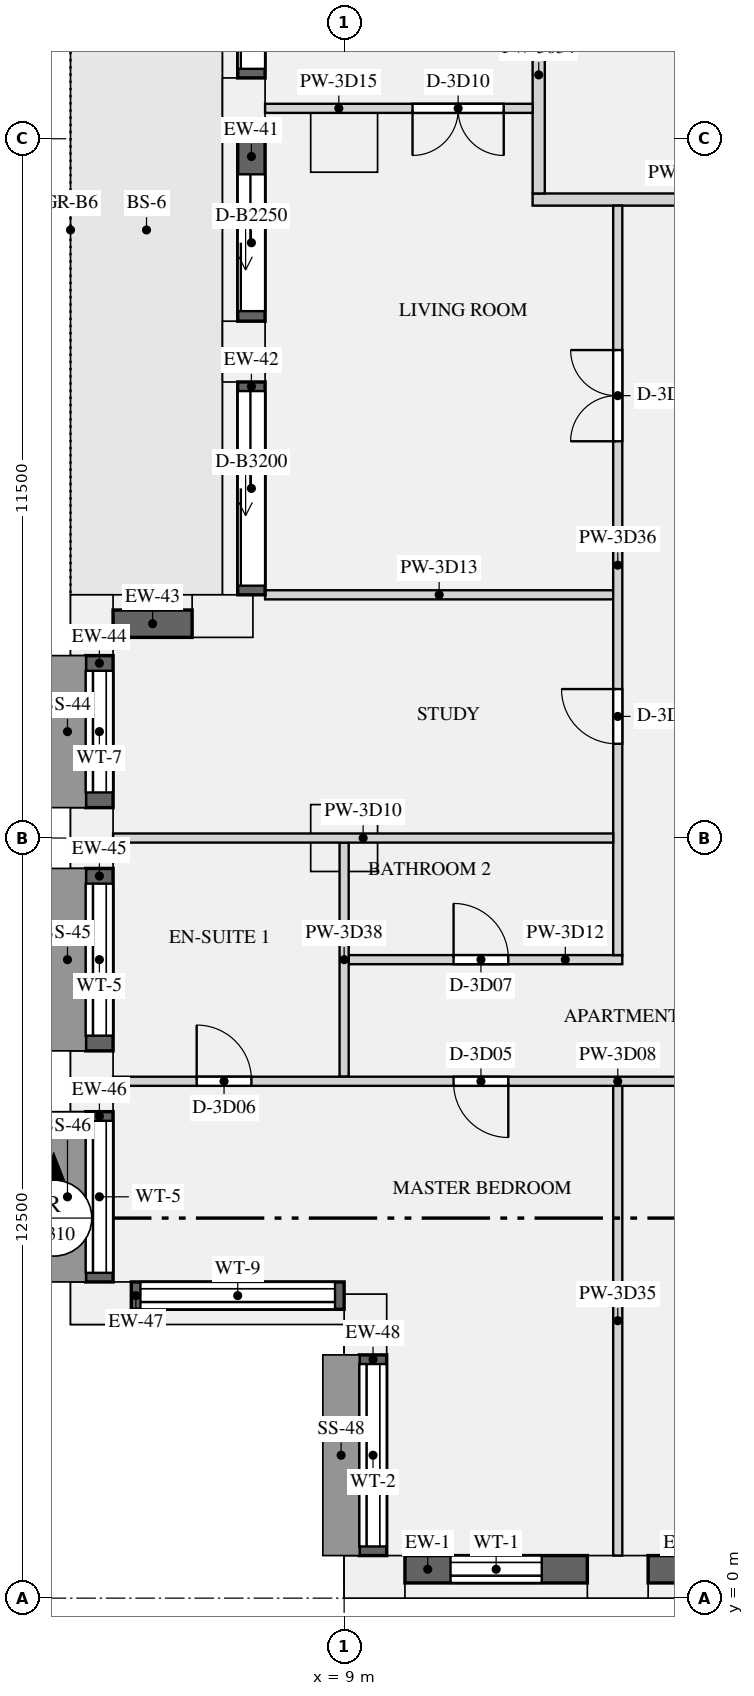
"""IFC4 building model, lengths in metres.
Left out: names, types, materials, properties, quantities, classifications, styles, units other than length and angle.
Written with IfcOpenShell. Run it as: python <this file> out.ifc"""

import sys

from ifc_helpers import new_model, si_unit, direction, frame, frame_2d, origin, origin_2d, place, context, subcontext, project, spatial, rectangle, extrude, element, fill, save


model = new_model("IFC4")
c1 = context("Model", 3, precision=1e-05, world=origin(), true_north=direction((0.0, 1.0)))
c2 = subcontext(c1, "Body", "Model", "MODEL_VIEW")
j1 = project(units=[si_unit("LENGTHUNIT", "METRE"), si_unit("PLANEANGLEUNIT", "RADIAN")], contexts=[c1])
p1 = place(None, origin())
s1 = spatial("IfcSite", under=j1, at=p1, CompositionType="ELEMENT")
p2 = place(p1, origin())
s2 = spatial("IfcBuilding", under=s1, at=p2, CompositionType="ELEMENT")
p3 = place(p2, frame((0.0, 0.0, 166.5)))
s3 = spatial("IfcBuildingStorey", under=s2, at=p3, CompositionType="ELEMENT", Elevation=166.5)
for number, where, z_axis, x_axis in (
    (1, (9.5, 0.35, 0.0), (0.0, 0.0, 1.0), (1.0, 0.0, 0.0)),
    (2, (13.5, 0.35, 0.0), (0.0, 0.0, 1.0), (1.0, 0.0, 0.0)),
    (3, (7.35, 24.5, 0.0), (0.0, 0.0, 1.0), (0.0, -1.0, 0.0)),
    (4, (7.35, 20.5, 0.0), (0.0, 0.0, 1.0), (0.0, -1.0, 0.0)),
    (5, (7.0, 16.15, 0.0), (0.0, 0.0, 1.0), (-1.0, 0.0, 0.0)),
    (6, (4.85, 16.0, 0.0), (0.0, 0.0, 1.0), (0.0, -1.0, 0.0)),
    (7, (4.85, 12.5, 0.0), (0.0, 0.0, 1.0), (0.0, -1.0, 0.0)),
    (8, (4.85, 8.5, 0.0), (0.0, 0.0, 1.0), (0.0, -1.0, 0.0)),
    (9, (5.0, 4.85, 0.0), (0.0, 0.0, 1.0), (1.0, 0.0, 0.0)),
    (10, (9.35, 4.5, 0.0), (0.0, 0.0, 1.0), (0.0, -1.0, 0.0)),
):
    element("IfcColumn", number, at=place(p3, frame(where, z_axis=z_axis, x_axis=x_axis)), inside=s3, PredefinedType="USERDEFINED", context=c2, shape_type="SweptSolid", body=[
        extrude(rectangle(XDim=1.0, YDim=0.7, at=origin_2d()), origin(), (0.0, 0.0, 1.0), 3.15),
    ])
for number, where, z_axis, x_axis in (
    (11, (9.0, 24.0, 0.0), (0.0, 0.0, 1.0), (1.0, 0.0, 0.0)),
    (12, (9.0, 12.5, 0.0), (0.0, 0.0, 1.0), (1.0, 0.0, 0.0)),
):
    element("IfcColumn", number, at=place(p3, frame(where, z_axis=z_axis, x_axis=x_axis)), inside=s3, PredefinedType="COLUMN", context=c2, shape_type="SweptSolid", body=[
        extrude(rectangle(XDim=1.1, YDim=1.1, at=origin_2d()), origin(), (0.0, 0.0, 1.0), 3.15),
    ])
p4 = place(p3, frame((10.0, 0.475, 0.9), z_axis=(0.0, 0.0, 1.0), x_axis=(1.0, 0.0, 0.0)))
e13 = element("IfcWall", 13, at=p4, inside=s3, PredefinedType="SOLIDWALL", context=c2, shape_type="SweptSolid", body=[
    extrude(rectangle(XDim=3.0, YDim=0.45, at=frame_2d((1.5, 0.0))), origin(), (0.0, 0.0, 1.0), 1.93),
])
p5 = place(p4, frame((0.75, 0.0, 0.15)))
e14 = element("IfcOpeningElement", 14, at=p5, cuts=e13, PredefinedType="OPENING", context=c2, shape_type="SweptSolid", body=[
    extrude(rectangle(XDim=1.5, YDim=1.5, at=frame_2d((0.75, 0.75))), frame((0.0, 0.235, 0.0), z_axis=(0.0, -1.0, 0.0), x_axis=(1.0, 0.0, 0.0)), (0.0, 0.0, 1.0), 0.47),
])
p6 = place(p3, frame((14.0, 0.475, 0.9), z_axis=(0.0, 0.0, 1.0), x_axis=(1.0, 0.0, 0.0)))
e15 = element("IfcWall", 15, at=p6, inside=s3, PredefinedType="SOLIDWALL", context=c2, shape_type="SweptSolid", body=[
    extrude(rectangle(XDim=4.0, YDim=0.45, at=frame_2d((2.0, 0.0))), origin(), (0.0, 0.0, 1.0), 1.93),
])
p7 = place(p6, frame((1.25, 0.0, 0.15)))
e16 = element("IfcOpeningElement", 16, at=p7, cuts=e15, PredefinedType="OPENING", context=c2, shape_type="SweptSolid", body=[
    extrude(rectangle(XDim=1.5, YDim=1.5, at=frame_2d((0.75, 0.75))), frame((0.0, 0.235, 0.0), z_axis=(0.0, -1.0, 0.0), x_axis=(1.0, 0.0, 0.0)), (0.0, 0.0, 1.0), 0.47),
])
p8 = place(p3, frame((7.475, 28.0, 0.0), z_axis=(0.0, 0.0, 1.0), x_axis=(0.0, -1.0, 0.0)))
e17 = element("IfcWall", 17, at=p8, inside=s3, PredefinedType="SOLIDWALL", context=c2, shape_type="SweptSolid", body=[
    extrude(rectangle(XDim=3.0, YDim=0.45, at=frame_2d((1.5, 0.0))), origin(), (0.0, 0.0, 1.0), 2.83),
])
p9 = place(p8, frame((0.15, 0.0, 0.0)))
e18 = element("IfcOpeningElement", 18, at=p9, cuts=e17, PredefinedType="OPENING", context=c2, shape_type="SweptSolid", body=[
    extrude(rectangle(XDim=2.7, YDim=2.3, at=frame_2d((1.35, 1.15))), frame((0.0, 0.235, 0.0), z_axis=(0.0, -1.0, 0.0), x_axis=(1.0, 0.0, 0.0)), (0.0, 0.0, 1.0), 0.47),
])
p10 = place(p3, frame((7.475, 24.0, 0.0), z_axis=(0.0, 0.0, 1.0), x_axis=(0.0, -1.0, 0.0)))
e19 = element("IfcWall", 19, at=p10, inside=s3, PredefinedType="SOLIDWALL", context=c2, shape_type="SweptSolid", body=[
    extrude(rectangle(XDim=3.0, YDim=0.45, at=frame_2d((1.5, 0.0))), origin(), (0.0, 0.0, 1.0), 2.83),
])
p11 = place(p10, frame((0.585, 0.0, 0.0)))
e20 = element("IfcOpeningElement", 20, at=p11, cuts=e19, PredefinedType="OPENING", context=c2, shape_type="SweptSolid", body=[
    extrude(rectangle(XDim=2.25, YDim=2.3, at=frame_2d((1.125, 1.15))), frame((0.0, 0.235, 0.0), z_axis=(0.0, -1.0, 0.0), x_axis=(1.0, 0.0, 0.0)), (0.0, 0.0, 1.0), 0.47),
])
p12 = place(p3, frame((7.475, 20.0, 0.0), z_axis=(0.0, 0.0, 1.0), x_axis=(0.0, -1.0, 0.0)))
e21 = element("IfcWall", 21, at=p12, inside=s3, PredefinedType="SOLIDWALL", context=c2, shape_type="SweptSolid", body=[
    extrude(rectangle(XDim=3.5, YDim=0.45, at=frame_2d((1.75, 0.0))), origin(), (0.0, 0.0, 1.0), 2.83),
])
p13 = place(p12, frame((0.15, 0.0, 0.0)))
e22 = element("IfcOpeningElement", 22, at=p13, cuts=e21, PredefinedType="OPENING", context=c2, shape_type="SweptSolid", body=[
    extrude(rectangle(XDim=3.2, YDim=2.3, at=frame_2d((1.6, 1.15))), frame((0.0, 0.235, 0.0), z_axis=(0.0, -1.0, 0.0), x_axis=(1.0, 0.0, 0.0)), (0.0, 0.0, 1.0), 0.47),
])
p14 = place(p3, frame((6.5, 16.025, 0.9), z_axis=(0.0, 0.0, 1.0), x_axis=(-1.0, 0.0, 0.0)))
e23 = element("IfcWall", 23, at=p14, inside=s3, PredefinedType="SOLIDWALL", context=c2, shape_type="SweptSolid", body=[
    extrude(rectangle(XDim=1.3, YDim=0.45, at=frame_2d((0.65, 0.0))), origin(), (0.0, 0.0, 1.0), 1.93),
])
p15 = place(p3, frame((4.975, 15.5, 0.9), z_axis=(0.0, 0.0, 1.0), x_axis=(0.0, -1.0, 0.0)))
e24 = element("IfcWall", 24, at=p15, inside=s3, PredefinedType="SOLIDWALL", context=c2, shape_type="SweptSolid", body=[
    extrude(rectangle(XDim=2.5, YDim=0.45, at=frame_2d((1.25, 0.0))), origin(), (0.0, 0.0, 1.0), 1.93),
])
p16 = place(p15, frame((0.25, 0.0, 0.15)))
e25 = element("IfcOpeningElement", 25, at=p16, cuts=e24, PredefinedType="OPENING", context=c2, shape_type="SweptSolid", body=[
    extrude(rectangle(XDim=2.0, YDim=1.5, at=frame_2d((1.0, 0.75))), frame((0.0, 0.235, 0.0), z_axis=(0.0, -1.0, 0.0), x_axis=(1.0, 0.0, 0.0)), (0.0, 0.0, 1.0), 0.47),
])
p17 = place(p3, frame((4.975, 12.0, 0.9), z_axis=(0.0, 0.0, 1.0), x_axis=(0.0, -1.0, 0.0)))
e26 = element("IfcWall", 26, at=p17, inside=s3, PredefinedType="SOLIDWALL", context=c2, shape_type="SweptSolid", body=[
    extrude(rectangle(XDim=3.0, YDim=0.45, at=frame_2d((1.5, 0.0))), origin(), (0.0, 0.0, 1.0), 1.93),
])
p18 = place(p17, frame((0.25, 0.0, 0.15)))
e27 = element("IfcOpeningElement", 27, at=p18, cuts=e26, PredefinedType="OPENING", context=c2, shape_type="SweptSolid", body=[
    extrude(rectangle(XDim=2.5, YDim=1.5, at=frame_2d((1.25, 0.75))), frame((0.0, 0.235, 0.0), z_axis=(0.0, -1.0, 0.0), x_axis=(1.0, 0.0, 0.0)), (0.0, 0.0, 1.0), 0.47),
])
p19 = place(p3, frame((4.975, 8.0, 0.9), z_axis=(0.0, 0.0, 1.0), x_axis=(0.0, -1.0, 0.0)))
e28 = element("IfcWall", 28, at=p19, inside=s3, PredefinedType="SOLIDWALL", context=c2, shape_type="SweptSolid", body=[
    extrude(rectangle(XDim=2.8, YDim=0.45, at=frame_2d((1.4, 0.0))), origin(), (0.0, 0.0, 1.0), 1.93),
])
p20 = place(p19, frame((0.15, 0.0, 0.15)))
e29 = element("IfcOpeningElement", 29, at=p20, cuts=e28, PredefinedType="OPENING", context=c2, shape_type="SweptSolid", body=[
    extrude(rectangle(XDim=2.5, YDim=1.5, at=frame_2d((1.25, 0.75))), frame((0.0, 0.235, 0.0), z_axis=(0.0, -1.0, 0.0), x_axis=(1.0, 0.0, 0.0)), (0.0, 0.0, 1.0), 0.47),
])
p21 = place(p3, frame((5.5, 4.975, 0.9), z_axis=(0.0, 0.0, 1.0), x_axis=(1.0, 0.0, 0.0)))
e30 = element("IfcWall", 30, at=p21, inside=s3, PredefinedType="SOLIDWALL", context=c2, shape_type="SweptSolid", body=[
    extrude(rectangle(XDim=3.5, YDim=0.45, at=frame_2d((1.75, 0.0))), origin(), (0.0, 0.0, 1.0), 1.93),
])
p22 = place(p21, frame((0.15, 0.0, 0.15)))
e31 = element("IfcOpeningElement", 31, at=p22, cuts=e30, PredefinedType="OPENING", context=c2, shape_type="SweptSolid", body=[
    extrude(rectangle(XDim=3.2, YDim=1.5, at=frame_2d((1.6, 0.75))), frame((0.0, 0.235, 0.0), z_axis=(0.0, -1.0, 0.0), x_axis=(1.0, 0.0, 0.0)), (0.0, 0.0, 1.0), 0.47),
])
p23 = place(p3, frame((9.475, 4.0, 0.9), z_axis=(0.0, 0.0, 1.0), x_axis=(0.0, -1.0, 0.0)))
e32 = element("IfcWall", 32, at=p23, inside=s3, PredefinedType="SOLIDWALL", context=c2, shape_type="SweptSolid", body=[
    extrude(rectangle(XDim=3.3, YDim=0.45, at=frame_2d((1.65, 0.0))), origin(), (0.0, 0.0, 1.0), 1.93),
])
p24 = place(p23, frame((0.15, 0.0, 0.15)))
e33 = element("IfcOpeningElement", 33, at=p24, cuts=e32, PredefinedType="OPENING", context=c2, shape_type="SweptSolid", body=[
    extrude(rectangle(XDim=3.0, YDim=1.5, at=frame_2d((1.5, 0.75))), frame((0.0, 0.235, 0.0), z_axis=(0.0, -1.0, 0.0), x_axis=(1.0, 0.0, 0.0)), (0.0, 0.0, 1.0), 0.47),
])
p25 = place(p3, frame((12.1, 23.0, 0.0), z_axis=(0.0, 0.0, 1.0), x_axis=(1.0, 0.0, 0.0)))
e34 = element("IfcWall", 34, at=p25, inside=s3, PredefinedType="PARTITIONING", context=c2, shape_type="SweptSolid", body=[
    extrude(rectangle(XDim=5.0, YDim=0.2, at=frame_2d((2.5, 0.0))), origin(), (0.0, 0.0, 1.0), 2.83),
])
p26 = place(p3, frame((12.2, 23.1, 0.0), z_axis=(0.0, 0.0, 1.0), x_axis=(0.0, 1.0, 0.0)))
e35 = element("IfcWall", 35, at=p26, inside=s3, PredefinedType="PARTITIONING", context=c2, shape_type="SweptSolid", body=[
    extrude(rectangle(XDim=3.9, YDim=0.2, at=frame_2d((1.95, 0.0))), origin(), (0.0, 0.0, 1.0), 2.83),
])
p27 = place(p3, frame((5.2, 8.5, 0.0), z_axis=(0.0, 0.0, 1.0), x_axis=(1.0, 0.0, 0.0)))
e36 = element("IfcWall", 36, at=p27, inside=s3, PredefinedType="PARTITIONING", context=c2, shape_type="SweptSolid", body=[
    extrude(rectangle(XDim=12.8, YDim=0.15, at=frame_2d((6.4, 0.0))), origin(), (0.0, 0.0, 1.0), 2.83),
])
p28 = place(p27, frame((10.1, 0.0, 0.0)))
e37 = element("IfcOpeningElement", 37, at=p28, cuts=e36, PredefinedType="OPENING", context=c2, shape_type="SweptSolid", body=[
    extrude(rectangle(XDim=0.9, YDim=2.1, at=frame_2d((0.45, 1.05))), frame((0.0, 0.085, 0.0), z_axis=(0.0, -1.0, 0.0), x_axis=(1.0, 0.0, 0.0)), (0.0, 0.0, 1.0), 0.17),
])
p29 = place(p27, frame((5.6, 0.0, 0.0)))
e38 = element("IfcOpeningElement", 38, at=p29, cuts=e36, PredefinedType="OPENING", context=c2, shape_type="SweptSolid", body=[
    extrude(rectangle(XDim=0.9, YDim=2.1, at=frame_2d((0.45, 1.05))), frame((0.0, 0.085, 0.0), z_axis=(0.0, -1.0, 0.0), x_axis=(1.0, 0.0, 0.0)), (0.0, 0.0, 1.0), 0.17),
])
p30 = place(p27, frame((1.375, 0.0, 0.0)))
e39 = element("IfcOpeningElement", 39, at=p30, cuts=e36, PredefinedType="OPENING", context=c2, shape_type="SweptSolid", body=[
    extrude(rectangle(XDim=0.9, YDim=2.1, at=frame_2d((0.45, 1.05))), frame((0.0, 0.085, 0.0), z_axis=(0.0, -1.0, 0.0), x_axis=(1.0, 0.0, 0.0)), (0.0, 0.0, 1.0), 0.17),
])
p31 = place(p3, frame((5.2, 12.5, 0.0), z_axis=(0.0, 0.0, 1.0), x_axis=(1.0, 0.0, 0.0)))
e40 = element("IfcWall", 40, at=p31, inside=s3, PredefinedType="PARTITIONING", context=c2, shape_type="SweptSolid", body=[
    extrude(rectangle(XDim=8.225, YDim=0.15, at=frame_2d((4.113, 0.0))), origin(), (0.0, 0.0, 1.0), 2.83),
])
p32 = place(p3, frame((9.075, 10.5, 0.0), z_axis=(0.0, 0.0, 1.0), x_axis=(1.0, 0.0, 0.0)))
e41 = element("IfcWall", 41, at=p32, inside=s3, PredefinedType="PARTITIONING", context=c2, shape_type="SweptSolid", body=[
    extrude(rectangle(XDim=4.5, YDim=0.15, at=frame_2d((2.25, 0.0))), origin(), (0.0, 0.0, 1.0), 2.83),
])
p33 = place(p32, frame((1.725, 0.0, 0.0)))
e42 = element("IfcOpeningElement", 42, at=p33, cuts=e41, PredefinedType="OPENING", context=c2, shape_type="SweptSolid", body=[
    extrude(rectangle(XDim=0.9, YDim=2.1, at=frame_2d((0.45, 1.05))), frame((0.0, 0.085, 0.0), z_axis=(0.0, -1.0, 0.0), x_axis=(1.0, 0.0, 0.0)), (0.0, 0.0, 1.0), 0.17),
])
p34 = place(p3, frame((7.7, 16.5, 0.0), z_axis=(0.0, 0.0, 1.0), x_axis=(1.0, 0.0, 0.0)))
e43 = element("IfcWall", 43, at=p34, inside=s3, PredefinedType="PARTITIONING", context=c2, shape_type="SweptSolid", body=[
    extrude(rectangle(XDim=5.725, YDim=0.15, at=frame_2d((2.863, 0.0))), origin(), (0.0, 0.0, 1.0), 2.83),
])
p35 = place(p3, frame((7.7, 24.5, 0.0), z_axis=(0.0, 0.0, 1.0), x_axis=(1.0, 0.0, 0.0)))
e44 = element("IfcWall", 44, at=p35, inside=s3, PredefinedType="PARTITIONING", context=c2, shape_type="SweptSolid", body=[
    extrude(rectangle(XDim=4.4, YDim=0.15, at=frame_2d((2.2, 0.0))), origin(), (0.0, 0.0, 1.0), 2.83),
])
p36 = place(p35, frame((2.425, 0.0, 0.0)))
e45 = element("IfcOpeningElement", 45, at=p36, cuts=e44, PredefinedType="OPENING", context=c2, shape_type="SweptSolid", body=[
    extrude(rectangle(XDim=1.5, YDim=2.1, at=frame_2d((0.75, 1.05))), frame((0.0, 0.085, 0.0), z_axis=(0.0, -1.0, 0.0), x_axis=(1.0, 0.0, 0.0)), (0.0, 0.0, 1.0), 0.17),
])
p37 = place(p3, frame((13.5, 0.7, 0.0), z_axis=(0.0, 0.0, 1.0), x_axis=(0.0, 1.0, 0.0)))
e46 = element("IfcWall", 46, at=p37, inside=s3, PredefinedType="PARTITIONING", context=c2, shape_type="SweptSolid", body=[
    extrude(rectangle(XDim=7.725, YDim=0.15, at=frame_2d((3.863, 0.0))), origin(), (0.0, 0.0, 1.0), 2.83),
])
p38 = place(p3, frame((13.5, 10.575, 0.0), z_axis=(0.0, 0.0, 1.0), x_axis=(0.0, 1.0, 0.0)))
e47 = element("IfcWall", 47, at=p38, inside=s3, PredefinedType="PARTITIONING", context=c2, shape_type="SweptSolid", body=[
    extrude(rectangle(XDim=12.325, YDim=0.15, at=frame_2d((6.163, 0.0))), origin(), (0.0, 0.0, 1.0), 2.83),
])
p39 = place(p38, frame((3.475, 0.0, 0.0)))
e48 = element("IfcOpeningElement", 48, at=p39, cuts=e47, PredefinedType="OPENING", context=c2, shape_type="SweptSolid", body=[
    extrude(rectangle(XDim=0.9, YDim=2.1, at=frame_2d((0.45, 1.05))), frame((0.0, 0.085, 0.0), z_axis=(0.0, -1.0, 0.0), x_axis=(1.0, 0.0, 0.0)), (0.0, 0.0, 1.0), 0.17),
])
p40 = place(p38, frame((8.45, 0.0, 0.0)))
e49 = element("IfcOpeningElement", 49, at=p40, cuts=e47, PredefinedType="OPENING", context=c2, shape_type="SweptSolid", body=[
    extrude(rectangle(XDim=1.5, YDim=2.1, at=frame_2d((0.75, 1.05))), frame((0.0, 0.085, 0.0), z_axis=(0.0, -1.0, 0.0), x_axis=(1.0, 0.0, 0.0)), (0.0, 0.0, 1.0), 0.17),
])
p41 = place(p3, frame((9.0, 8.575, 0.0), z_axis=(0.0, 0.0, 1.0), x_axis=(0.0, 1.0, 0.0)))
e50 = element("IfcWall", 50, at=p41, inside=s3, PredefinedType="PARTITIONING", context=c2, shape_type="SweptSolid", body=[
    extrude(rectangle(XDim=3.85, YDim=0.15, at=frame_2d((1.925, 0.0))), origin(), (0.0, 0.0, 1.0), 2.83),
])
p42 = place(p5, origin())
e51 = element("IfcWindow", 51, at=p42, inside=s3, PartitioningType="SINGLE_PANEL", PredefinedType="WINDOW", context=c2, shape_type="SweptSolid", body=[
    extrude(rectangle(XDim=1.5, YDim=1.5, at=frame_2d((0.75, 0.75))), frame((0.0, -0.065, 0.0), z_axis=(0.0, -1.0, 0.0), x_axis=(1.0, 0.0, 0.0)), (0.0, 0.0, 1.0), 0.06),
])
fill(e14, e51)
p43 = place(p9, origin())
e52 = element("IfcDoor", 52, at=p43, inside=s3, OperationType="SLIDING_TO_LEFT", PredefinedType="DOOR", context=c2, shape_type="SweptSolid", body=[
    extrude(rectangle(XDim=2.7, YDim=2.3, at=frame_2d((1.35, 1.15))), frame((0.0, -0.07, 0.0), z_axis=(0.0, -1.0, 0.0), x_axis=(1.0, 0.0, 0.0)), (0.0, 0.0, 1.0), 0.05),
])
fill(e18, e52)
p44 = place(p11, origin())
e53 = element("IfcDoor", 53, at=p44, inside=s3, OperationType="SLIDING_TO_LEFT", PredefinedType="DOOR", context=c2, shape_type="SweptSolid", body=[
    extrude(rectangle(XDim=2.25, YDim=2.3, at=frame_2d((1.125, 1.15))), frame((0.0, -0.07, 0.0), z_axis=(0.0, -1.0, 0.0), x_axis=(1.0, 0.0, 0.0)), (0.0, 0.0, 1.0), 0.05),
])
fill(e20, e53)
p45 = place(p13, origin())
e54 = element("IfcDoor", 54, at=p45, inside=s3, OperationType="SLIDING_TO_LEFT", PredefinedType="DOOR", context=c2, shape_type="SweptSolid", body=[
    extrude(rectangle(XDim=3.2, YDim=2.3, at=frame_2d((1.6, 1.15))), frame((0.0, -0.07, 0.0), z_axis=(0.0, -1.0, 0.0), x_axis=(1.0, 0.0, 0.0)), (0.0, 0.0, 1.0), 0.05),
])
fill(e22, e54)
p46 = place(p16, origin())
e55 = element("IfcWindow", 55, at=p46, inside=s3, PartitioningType="SINGLE_PANEL", PredefinedType="WINDOW", context=c2, shape_type="SweptSolid", body=[
    extrude(rectangle(XDim=2.0, YDim=1.5, at=frame_2d((1.0, 0.75))), frame((0.0, -0.065, 0.0), z_axis=(0.0, -1.0, 0.0), x_axis=(1.0, 0.0, 0.0)), (0.0, 0.0, 1.0), 0.06),
])
fill(e25, e55)
p47 = place(p18, origin())
e56 = element("IfcWindow", 56, at=p47, inside=s3, PartitioningType="SINGLE_PANEL", PredefinedType="WINDOW", context=c2, shape_type="SweptSolid", body=[
    extrude(rectangle(XDim=2.5, YDim=1.5, at=frame_2d((1.25, 0.75))), frame((0.0, -0.065, 0.0), z_axis=(0.0, -1.0, 0.0), x_axis=(1.0, 0.0, 0.0)), (0.0, 0.0, 1.0), 0.06),
])
fill(e27, e56)
p48 = place(p20, origin())
e57 = element("IfcWindow", 57, at=p48, inside=s3, PartitioningType="SINGLE_PANEL", PredefinedType="WINDOW", context=c2, shape_type="SweptSolid", body=[
    extrude(rectangle(XDim=2.5, YDim=1.5, at=frame_2d((1.25, 0.75))), frame((0.0, -0.065, 0.0), z_axis=(0.0, -1.0, 0.0), x_axis=(1.0, 0.0, 0.0)), (0.0, 0.0, 1.0), 0.06),
])
fill(e29, e57)
p49 = place(p22, origin())
e58 = element("IfcWindow", 58, at=p49, inside=s3, PartitioningType="SINGLE_PANEL", PredefinedType="WINDOW", context=c2, shape_type="SweptSolid", body=[
    extrude(rectangle(XDim=3.2, YDim=1.5, at=frame_2d((1.6, 0.75))), frame((0.0, -0.065, 0.0), z_axis=(0.0, -1.0, 0.0), x_axis=(1.0, 0.0, 0.0)), (0.0, 0.0, 1.0), 0.06),
])
fill(e31, e58)
p50 = place(p24, origin())
e59 = element("IfcWindow", 59, at=p50, inside=s3, PartitioningType="SINGLE_PANEL", PredefinedType="WINDOW", context=c2, shape_type="SweptSolid", body=[
    extrude(rectangle(XDim=3.0, YDim=1.5, at=frame_2d((1.5, 0.75))), frame((0.0, -0.065, 0.0), z_axis=(0.0, -1.0, 0.0), x_axis=(1.0, 0.0, 0.0)), (0.0, 0.0, 1.0), 0.06),
])
fill(e33, e59)
p51 = place(p29, frame((0.9, 0.0, 0.0), z_axis=(0.0, 0.0, 1.0), x_axis=(-1.0, 0.0, 0.0)))
e60 = element("IfcDoor", 60, at=p51, inside=s3, OperationType="SINGLE_SWING_LEFT", PredefinedType="DOOR", context=c2, shape_type="SweptSolid", body=[
    extrude(rectangle(XDim=0.9, YDim=2.1, at=frame_2d((0.45, 1.05))), frame((0.0, 0.025, 0.0), z_axis=(0.0, -1.0, 0.0), x_axis=(1.0, 0.0, 0.0)), (0.0, 0.0, 1.0), 0.05),
])
fill(e38, e60)
p52 = place(p30, origin())
e61 = element("IfcDoor", 61, at=p52, inside=s3, OperationType="SINGLE_SWING_LEFT", PredefinedType="DOOR", context=c2, shape_type="SweptSolid", body=[
    extrude(rectangle(XDim=0.9, YDim=2.1, at=frame_2d((0.45, 1.05))), frame((0.0, 0.025, 0.0), z_axis=(0.0, -1.0, 0.0), x_axis=(1.0, 0.0, 0.0)), (0.0, 0.0, 1.0), 0.05),
])
fill(e39, e61)
p53 = place(p33, origin())
e62 = element("IfcDoor", 62, at=p53, inside=s3, OperationType="SINGLE_SWING_LEFT", PredefinedType="DOOR", context=c2, shape_type="SweptSolid", body=[
    extrude(rectangle(XDim=0.9, YDim=2.1, at=frame_2d((0.45, 1.05))), frame((0.0, 0.025, 0.0), z_axis=(0.0, -1.0, 0.0), x_axis=(1.0, 0.0, 0.0)), (0.0, 0.0, 1.0), 0.05),
])
fill(e42, e62)
p54 = place(p39, origin())
e63 = element("IfcDoor", 63, at=p54, inside=s3, OperationType="SINGLE_SWING_RIGHT", PredefinedType="DOOR", context=c2, shape_type="SweptSolid", body=[
    extrude(rectangle(XDim=0.9, YDim=2.1, at=frame_2d((0.45, 1.05))), frame((0.0, 0.025, 0.0), z_axis=(0.0, -1.0, 0.0), x_axis=(1.0, 0.0, 0.0)), (0.0, 0.0, 1.0), 0.05),
])
fill(e48, e63)
p55 = place(p40, origin())
e64 = element("IfcDoor", 64, at=p55, inside=s3, OperationType="DOUBLE_DOOR_SINGLE_SWING", PredefinedType="DOOR", context=c2, shape_type="SweptSolid", body=[
    extrude(rectangle(XDim=1.5, YDim=2.1, at=frame_2d((0.75, 1.05))), frame((0.0, 0.025, 0.0), z_axis=(0.0, -1.0, 0.0), x_axis=(1.0, 0.0, 0.0)), (0.0, 0.0, 1.0), 0.05),
])
fill(e49, e64)
p56 = place(p36, frame((1.5, 0.0, 0.0), z_axis=(0.0, 0.0, 1.0), x_axis=(-1.0, 0.0, 0.0)))
e65 = element("IfcDoor", 65, at=p56, inside=s3, OperationType="DOUBLE_DOOR_SINGLE_SWING", PredefinedType="DOOR", context=c2, shape_type="SweptSolid", body=[
    extrude(rectangle(XDim=1.5, YDim=2.1, at=frame_2d((0.75, 1.05))), frame((0.0, 0.025, 0.0), z_axis=(0.0, -1.0, 0.0), x_axis=(1.0, 0.0, 0.0)), (0.0, 0.0, 1.0), 0.05),
])
fill(e45, e65)
save(model, sys.argv[1])
